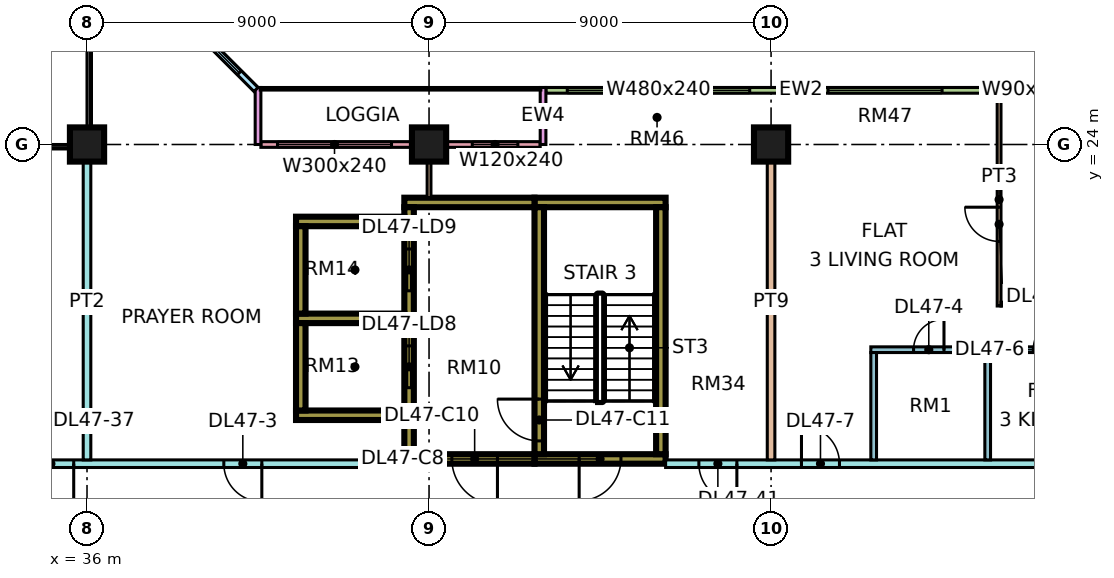
"""IFC4 building model, lengths in metres.
Left out: names, types, materials, properties, quantities, classifications, styles, units other than length and angle.
Written with IfcOpenShell. Run it as: python <this file> out.ifc"""

import sys

from ifc_helpers import new_model, si_unit, direction, frame, frame_2d, origin, origin_2d, place, context, subcontext, project, spatial, rectangle, extrude, element, fill, save


model = new_model("IFC4")
c1 = context("Model", 3, precision=1e-05, world=origin(), true_north=direction((0.0, 1.0)))
c2 = subcontext(c1, "Body", "Model", "MODEL_VIEW")
j1 = project(units=[si_unit("LENGTHUNIT", "METRE"), si_unit("PLANEANGLEUNIT", "RADIAN")], contexts=[c1])
p1 = place(None, origin())
s1 = spatial("IfcSite", under=j1, at=p1, CompositionType="ELEMENT")
p2 = place(p1, origin())
s2 = spatial("IfcBuilding", under=s1, at=p2, CompositionType="ELEMENT")
p3 = place(p2, frame((0.0, 0.0, 202.4)))
s3 = spatial("IfcBuildingStorey", under=s2, at=p3, CompositionType="ELEMENT", Elevation=202.4)
for number, where, z_axis, x_axis in (
    (1, (36.0, 24.0, 0.0), (0.0, 0.0, 1.0), (1.0, 0.0, 0.0)),
    (2, (45.0, 24.0, 0.0), (0.0, 0.0, 1.0), (1.0, 0.0, 0.0)),
    (3, (54.0, 24.0, 0.0), (0.0, 0.0, 1.0), (1.0, 0.0, 0.0)),
):
    element("IfcColumn", number, at=place(p3, frame(where, z_axis=z_axis, x_axis=x_axis)), inside=s3, PredefinedType="COLUMN", context=c2, shape_type="SweptSolid", body=[
        extrude(rectangle(XDim=0.9, YDim=0.9, at=origin_2d()), origin(), (0.0, 0.0, 1.0), 3.75),
    ])
p4 = place(p3, frame((47.775, 15.725, 0.0), z_axis=(0.0, 0.0, 1.0), x_axis=(1.0, 0.0, 0.0)))
e4 = element("IfcWall", 4, at=p4, inside=s3, PredefinedType="SHEAR", context=c2, shape_type="SweptSolid", body=[
    extrude(rectangle(XDim=3.45, YDim=0.25, at=frame_2d((1.725, 0.0))), origin(), (0.0, 0.0, 1.0), 3.75),
])
p5 = place(p4, frame((1.175, 0.0, 0.0)))
e5 = element("IfcOpeningElement", 5, at=p5, cuts=e4, PredefinedType="OPENING", context=c2, shape_type="SweptSolid", body=[
    extrude(rectangle(XDim=1.1, YDim=2.2, at=frame_2d((0.55, 1.1))), frame((0.0, 0.135, 0.0), z_axis=(0.0, -1.0, 0.0), x_axis=(1.0, 0.0, 0.0)), (0.0, 0.0, 1.0), 0.27),
])
p6 = place(p3, frame((47.775, 22.475, 0.0), z_axis=(0.0, 0.0, 1.0), x_axis=(1.0, 0.0, 0.0)))
e6 = element("IfcWall", 6, at=p6, inside=s3, PredefinedType="SHEAR", context=c2, shape_type="SweptSolid", body=[
    extrude(rectangle(XDim=3.45, YDim=0.25, at=frame_2d((1.725, 0.0))), origin(), (0.0, 0.0, 1.0), 3.75),
])
p7 = place(p3, frame((47.9, 15.85, 0.0), z_axis=(0.0, 0.0, 1.0), x_axis=(0.0, 1.0, 0.0)))
e7 = element("IfcWall", 7, at=p7, inside=s3, PredefinedType="SHEAR", context=c2, shape_type="SweptSolid", body=[
    extrude(rectangle(XDim=6.5, YDim=0.25, at=frame_2d((3.25, 0.0))), origin(), (0.0, 0.0, 1.0), 3.75),
])
p8 = place(p7, frame((0.35, 0.0, 0.0)))
e8 = element("IfcOpeningElement", 8, at=p8, cuts=e7, PredefinedType="OPENING", context=c2, shape_type="SweptSolid", body=[
    extrude(rectangle(XDim=1.1, YDim=2.2, at=frame_2d((0.55, 1.1))), frame((0.0, 0.135, 0.0), z_axis=(0.0, -1.0, 0.0), x_axis=(1.0, 0.0, 0.0)), (0.0, 0.0, 1.0), 0.27),
])
p9 = place(p3, frame((51.1, 15.85, 0.0), z_axis=(0.0, 0.0, 1.0), x_axis=(0.0, 1.0, 0.0)))
e9 = element("IfcWall", 9, at=p9, inside=s3, PredefinedType="SHEAR", context=c2, shape_type="SweptSolid", body=[
    extrude(rectangle(XDim=6.5, YDim=0.25, at=frame_2d((3.25, 0.0))), origin(), (0.0, 0.0, 1.0), 3.75),
])
p10 = place(p3, frame((44.35, 15.725, 0.0), z_axis=(0.0, 0.0, 1.0), x_axis=(1.0, 0.0, 0.0)))
e10 = element("IfcWall", 10, at=p10, inside=s3, PredefinedType="SHEAR", context=c2, shape_type="SweptSolid", body=[
    extrude(rectangle(XDim=3.425, YDim=0.25, at=frame_2d((1.712, 0.0))), origin(), (0.0, 0.0, 1.0), 3.75),
])
p11 = place(p10, frame((1.25, 0.0, 0.0)))
e11 = element("IfcOpeningElement", 11, at=p11, cuts=e10, PredefinedType="OPENING", context=c2, shape_type="SweptSolid", body=[
    extrude(rectangle(XDim=1.2, YDim=2.2, at=frame_2d((0.6, 1.1))), frame((0.0, 0.135, 0.0), z_axis=(0.0, -1.0, 0.0), x_axis=(1.0, 0.0, 0.0)), (0.0, 0.0, 1.0), 0.27),
])
p12 = place(p3, frame((44.35, 22.475, 0.0), z_axis=(0.0, 0.0, 1.0), x_axis=(1.0, 0.0, 0.0)))
e12 = element("IfcWall", 12, at=p12, inside=s3, PredefinedType="SHEAR", context=c2, shape_type="SweptSolid", body=[
    extrude(rectangle(XDim=3.425, YDim=0.25, at=frame_2d((1.712, 0.0))), origin(), (0.0, 0.0, 1.0), 3.75),
])
p13 = place(p3, frame((44.475, 15.85, 0.0), z_axis=(0.0, 0.0, 1.0), x_axis=(0.0, 1.0, 0.0)))
e13 = element("IfcWall", 13, at=p13, inside=s3, PredefinedType="SHEAR", context=c2, shape_type="SweptSolid", body=[
    extrude(rectangle(XDim=6.5, YDim=0.25, at=frame_2d((3.25, 0.0))), origin(), (0.0, 0.0, 1.0), 3.75),
])
p14 = place(p13, frame((1.75, 0.0, 0.0)))
e14 = element("IfcOpeningElement", 14, at=p14, cuts=e13, PredefinedType="OPENING", context=c2, shape_type="SweptSolid", body=[
    extrude(rectangle(XDim=1.1, YDim=2.2, at=frame_2d((0.55, 1.1))), frame((0.0, 0.135, 0.0), z_axis=(0.0, -1.0, 0.0), x_axis=(1.0, 0.0, 0.0)), (0.0, 0.0, 1.0), 0.27),
])
p15 = place(p13, frame((4.3, 0.0, 0.0)))
e15 = element("IfcOpeningElement", 15, at=p15, cuts=e13, PredefinedType="OPENING", context=c2, shape_type="SweptSolid", body=[
    extrude(rectangle(XDim=1.1, YDim=2.2, at=frame_2d((0.55, 1.1))), frame((0.0, 0.135, 0.0), z_axis=(0.0, -1.0, 0.0), x_axis=(1.0, 0.0, 0.0)), (0.0, 0.0, 1.0), 0.27),
])
for number, where, z_axis, x_axis in (
    (16, (41.5, 16.875, 0.0), (0.0, 0.0, 1.0), (1.0, 0.0, 0.0)),
    (17, (41.5, 19.425, 0.0), (0.0, 0.0, 1.0), (1.0, 0.0, 0.0)),
    (18, (41.5, 21.975, 0.0), (0.0, 0.0, 1.0), (1.0, 0.0, 0.0)),
):
    element("IfcWall", number, at=place(p3, frame(where, z_axis=z_axis, x_axis=x_axis)), inside=s3, PredefinedType="SHEAR", context=c2, shape_type="SweptSolid", body=[
        extrude(rectangle(XDim=2.85, YDim=0.25, at=frame_2d((1.425, 0.0))), origin(), (0.0, 0.0, 1.0), 3.75),
    ])
for number, where, z_axis, x_axis in (
    (19, (41.625, 17.0, 0.0), (0.0, 0.0, 1.0), (0.0, 1.0, 0.0)),
    (20, (41.625, 19.55, 0.0), (0.0, 0.0, 1.0), (0.0, 1.0, 0.0)),
):
    element("IfcWall", number, at=place(p3, frame(where, z_axis=z_axis, x_axis=x_axis)), inside=s3, PredefinedType="SHEAR", context=c2, shape_type="SweptSolid", body=[
        extrude(rectangle(XDim=2.3, YDim=0.25, at=frame_2d((1.15, 0.0))), origin(), (0.0, 0.0, 1.0), 3.75),
    ])
p16 = place(p3, frame((61.5, 25.425, 0.0), z_axis=(0.0, 0.0, 1.0), x_axis=(-1.0, 0.0, 0.0)))
e21 = element("IfcWall", 21, at=p16, inside=s3, PredefinedType="SOLIDWALL", context=c2, shape_type="SweptSolid", body=[
    extrude(rectangle(XDim=13.425, YDim=0.15, at=frame_2d((6.712, 0.0))), origin(), (0.0, 0.0, 1.0), 3.3),
])
p17 = place(p16, frame((0.3, 0.0, 0.45)))
e22 = element("IfcOpeningElement", 22, at=p17, cuts=e21, PredefinedType="OPENING", context=c2, shape_type="SweptSolid", body=[
    extrude(rectangle(XDim=0.9, YDim=2.4, at=frame_2d((0.45, 1.2))), frame((0.0, 0.085, 0.0), z_axis=(0.0, -1.0, 0.0), x_axis=(1.0, 0.0, 0.0)), (0.0, 0.0, 1.0), 0.17),
])
p18 = place(p16, frame((3.0, 0.0, 0.45)))
e23 = element("IfcOpeningElement", 23, at=p18, cuts=e21, PredefinedType="OPENING", context=c2, shape_type="SweptSolid", body=[
    extrude(rectangle(XDim=3.0, YDim=2.4, at=frame_2d((1.5, 1.2))), frame((0.0, 0.085, 0.0), z_axis=(0.0, -1.0, 0.0), x_axis=(1.0, 0.0, 0.0)), (0.0, 0.0, 1.0), 0.17),
])
p19 = place(p16, frame((8.062, 0.0, 0.45)))
e24 = element("IfcOpeningElement", 24, at=p19, cuts=e21, PredefinedType="OPENING", context=c2, shape_type="SweptSolid", body=[
    extrude(rectangle(XDim=4.8, YDim=2.4, at=frame_2d((2.4, 1.2))), frame((0.0, 0.085, 0.0), z_axis=(0.0, -1.0, 0.0), x_axis=(1.0, 0.0, 0.0)), (0.0, 0.0, 1.0), 0.17),
])
p20 = place(p3, frame((47.925, 24.0, 0.0), z_axis=(0.0, 0.0, 1.0), x_axis=(-1.0, 0.0, 0.0)))
e25 = element("IfcWall", 25, at=p20, inside=s3, PredefinedType="SOLIDWALL", context=c2, shape_type="SweptSolid", body=[
    extrude(rectangle(XDim=7.35, YDim=0.15, at=frame_2d((3.675, 0.0))), origin(), (0.0, 0.0, 1.0), 3.3),
])
p21 = place(p20, frame((0.587, 0.0, 0.45)))
e26 = element("IfcOpeningElement", 26, at=p21, cuts=e25, PredefinedType="OPENING", context=c2, shape_type="SweptSolid", body=[
    extrude(rectangle(XDim=1.2, YDim=2.4, at=frame_2d((0.6, 1.2))), frame((0.0, 0.085, 0.0), z_axis=(0.0, -1.0, 0.0), x_axis=(1.0, 0.0, 0.0)), (0.0, 0.0, 1.0), 0.17),
])
p22 = place(p20, frame((3.913, 0.0, 0.45)))
e27 = element("IfcOpeningElement", 27, at=p22, cuts=e25, PredefinedType="OPENING", context=c2, shape_type="SweptSolid", body=[
    extrude(rectangle(XDim=3.0, YDim=2.4, at=frame_2d((1.5, 1.2))), frame((0.0, 0.085, 0.0), z_axis=(0.0, -1.0, 0.0), x_axis=(1.0, 0.0, 0.0)), (0.0, 0.0, 1.0), 0.17),
])
for number, where, z_axis, x_axis in (
    (28, (48.0, 25.5, 0.0), (0.0, 0.0, 1.0), (0.0, -1.0, 0.0)),
    (29, (40.5, 25.5, 0.0), (0.0, 0.0, 1.0), (0.0, -1.0, 0.0)),
):
    element("IfcWall", number, at=place(p3, frame(where, z_axis=z_axis, x_axis=x_axis)), inside=s3, PredefinedType="SOLIDWALL", context=c2, shape_type="SweptSolid", body=[
        extrude(rectangle(XDim=1.5, YDim=0.15, at=frame_2d((0.75, 0.0))), origin(), (0.0, 0.0, 1.0), 3.3),
    ])
p23 = place(p3, frame((40.447, 25.447, 0.0), z_axis=(0.0, 0.0, 1.0), x_axis=(-0.707106781187, 0.707106781187, 0.0)))
e30 = element("IfcWall", 30, at=p23, inside=s3, PredefinedType="SOLIDWALL", context=c2, shape_type="SweptSolid", body=[
    extrude(rectangle(XDim=4.243, YDim=0.15, at=frame_2d((2.121, 0.0))), origin(), (0.0, 0.0, 1.0), 3.3),
])
p24 = place(p23, frame((0.621, 0.0, 0.45)))
e31 = element("IfcOpeningElement", 31, at=p24, cuts=e30, PredefinedType="OPENING", context=c2, shape_type="SweptSolid", body=[
    extrude(rectangle(XDim=3.0, YDim=2.4, at=frame_2d((1.5, 1.2))), frame((0.0, 0.085, 0.0), z_axis=(0.0, -1.0, 0.0), x_axis=(1.0, 0.0, 0.0)), (0.0, 0.0, 1.0), 0.17),
])
p25 = place(p3, frame((34.0, 15.6, 0.0), z_axis=(0.0, 0.0, 1.0), x_axis=(1.0, 0.0, 0.0)))
e32 = element("IfcWall", 32, at=p25, inside=s3, PredefinedType="PARTITIONING", context=c2, shape_type="SweptSolid", body=[
    extrude(rectangle(XDim=10.35, YDim=0.2, at=frame_2d((5.175, 0.0))), origin(), (0.0, 0.0, 1.0), 3.3),
])
p26 = place(p25, frame((5.6, 0.0, 0.0)))
e33 = element("IfcOpeningElement", 33, at=p26, cuts=e32, PredefinedType="OPENING", context=c2, shape_type="SweptSolid", body=[
    extrude(rectangle(XDim=1.0, YDim=2.1, at=frame_2d((0.5, 1.05))), frame((0.0, 0.11, 0.0), z_axis=(0.0, -1.0, 0.0), x_axis=(1.0, 0.0, 0.0)), (0.0, 0.0, 1.0), 0.22),
])
p27 = place(p25, frame((0.45, 0.0, 0.0)))
e34 = element("IfcOpeningElement", 34, at=p27, cuts=e32, PredefinedType="OPENING", context=c2, shape_type="SweptSolid", body=[
    extrude(rectangle(XDim=1.2, YDim=2.1, at=frame_2d((0.6, 1.05))), frame((0.0, 0.11, 0.0), z_axis=(0.0, -1.0, 0.0), x_axis=(1.0, 0.0, 0.0)), (0.0, 0.0, 1.0), 0.22),
])
p28 = place(p3, frame((36.0, 15.7, 0.0), z_axis=(0.0, 0.0, 1.0), x_axis=(0.0, 1.0, 0.0)))
e35 = element("IfcWall", 35, at=p28, inside=s3, PredefinedType="PARTITIONING", context=c2, shape_type="SweptSolid", body=[
    extrude(rectangle(XDim=8.3, YDim=0.2, at=frame_2d((4.15, 0.0))), origin(), (0.0, 0.0, 1.0), 3.3),
])
p29 = place(p3, frame((45.0, 22.6, 0.0), z_axis=(0.0, 0.0, 1.0), x_axis=(0.0, 1.0, 0.0)))
e36 = element("IfcWall", 36, at=p29, inside=s3, PredefinedType="PARTITIONING", context=c2, shape_type="SweptSolid", body=[
    extrude(rectangle(XDim=1.326, YDim=0.1, at=frame_2d((0.663, 0.0))), origin(), (0.0, 0.0, 1.0), 3.3),
])
p30 = place(p3, frame((51.225, 15.6, 0.0), z_axis=(0.0, 0.0, 1.0), x_axis=(1.0, 0.0, 0.0)))
e37 = element("IfcWall", 37, at=p30, inside=s3, PredefinedType="PARTITIONING", context=c2, shape_type="SweptSolid", body=[
    extrude(rectangle(XDim=11.701, YDim=0.2, at=frame_2d((5.851, 0.0))), origin(), (0.0, 0.0, 1.0), 3.3),
])
p31 = place(p30, frame((3.575, 0.0, 0.0)))
e38 = element("IfcOpeningElement", 38, at=p31, cuts=e37, PredefinedType="OPENING", context=c2, shape_type="SweptSolid", body=[
    extrude(rectangle(XDim=1.0, YDim=2.1, at=frame_2d((0.5, 1.05))), frame((0.0, 0.11, 0.0), z_axis=(0.0, -1.0, 0.0), x_axis=(1.0, 0.0, 0.0)), (0.0, 0.0, 1.0), 0.22),
])
p32 = place(p30, frame((0.875, 0.0, 0.0)))
e39 = element("IfcOpeningElement", 39, at=p32, cuts=e37, PredefinedType="OPENING", context=c2, shape_type="SweptSolid", body=[
    extrude(rectangle(XDim=1.0, YDim=2.1, at=frame_2d((0.5, 1.05))), frame((0.0, 0.11, 0.0), z_axis=(0.0, -1.0, 0.0), x_axis=(1.0, 0.0, 0.0)), (0.0, 0.0, 1.0), 0.22),
])
p33 = place(p3, frame((54.0, 15.7, 0.0), z_axis=(0.0, 0.0, 1.0), x_axis=(0.0, 1.0, 0.0)))
e40 = element("IfcWall", 40, at=p33, inside=s3, PredefinedType="PARTITIONING", context=c2, shape_type="SweptSolid", body=[
    extrude(rectangle(XDim=8.3, YDim=0.2, at=frame_2d((4.15, 0.0))), origin(), (0.0, 0.0, 1.0), 3.3),
])
p34 = place(p3, frame((56.625, 18.6, 0.0), z_axis=(0.0, 0.0, 1.0), x_axis=(1.0, 0.0, 0.0)))
e41 = element("IfcWall", 41, at=p34, inside=s3, PredefinedType="PARTITIONING", context=c2, shape_type="SweptSolid", body=[
    extrude(rectangle(XDim=6.301, YDim=0.15, at=frame_2d((3.15, 0.0))), origin(), (0.0, 0.0, 1.0), 3.3),
])
p35 = place(p34, frame((1.125, 0.0, 0.0)))
e42 = element("IfcOpeningElement", 42, at=p35, cuts=e41, PredefinedType="OPENING", context=c2, shape_type="SweptSolid", body=[
    extrude(rectangle(XDim=0.8, YDim=2.1, at=frame_2d((0.4, 1.05))), frame((0.0, 0.085, 0.0), z_axis=(0.0, -1.0, 0.0), x_axis=(1.0, 0.0, 0.0)), (0.0, 0.0, 1.0), 0.17),
])
p36 = place(p34, frame((4.275, 0.0, 0.0)))
e43 = element("IfcOpeningElement", 43, at=p36, cuts=e41, PredefinedType="OPENING", context=c2, shape_type="SweptSolid", body=[
    extrude(rectangle(XDim=0.9, YDim=2.1, at=frame_2d((0.45, 1.05))), frame((0.0, 0.085, 0.0), z_axis=(0.0, -1.0, 0.0), x_axis=(1.0, 0.0, 0.0)), (0.0, 0.0, 1.0), 0.17),
])
for number, where, z_axis, x_axis in (
    (44, (56.7, 15.7, 0.0), (0.0, 0.0, 1.0), (0.0, 1.0, 0.0)),
    (45, (59.7, 15.7, 0.0), (0.0, 0.0, 1.0), (0.0, 1.0, 0.0)),
):
    element("IfcWall", number, at=place(p3, frame(where, z_axis=z_axis, x_axis=x_axis)), inside=s3, PredefinedType="PARTITIONING", context=c2, shape_type="SweptSolid", body=[
        extrude(rectangle(XDim=2.825, YDim=0.15, at=frame_2d((1.413, 0.0))), origin(), (0.0, 0.0, 1.0), 3.3),
    ])
p37 = place(p3, frame((60.0, 19.75, 0.0), z_axis=(0.0, 0.0, 1.0), x_axis=(0.0, 1.0, 0.0)))
e46 = element("IfcWall", 46, at=p37, inside=s3, PredefinedType="PARTITIONING", context=c2, shape_type="SweptSolid", body=[
    extrude(rectangle(XDim=5.6, YDim=0.1, at=frame_2d((2.8, 0.0))), origin(), (0.0, 0.0, 1.0), 3.3),
])
p38 = place(p37, frame((1.7, 0.0, 0.0)))
e47 = element("IfcOpeningElement", 47, at=p38, cuts=e46, PredefinedType="OPENING", context=c2, shape_type="SweptSolid", body=[
    extrude(rectangle(XDim=0.9, YDim=2.1, at=frame_2d((0.45, 1.05))), frame((0.0, 0.06, 0.0), z_axis=(0.0, -1.0, 0.0), x_axis=(1.0, 0.0, 0.0)), (0.0, 0.0, 1.0), 0.12),
])
p39 = place(p3, frame((60.05, 19.8, 0.0), z_axis=(0.0, 0.0, 1.0), x_axis=(1.0, 0.0, 0.0)))
e48 = element("IfcWall", 48, at=p39, inside=s3, PredefinedType="PARTITIONING", context=c2, shape_type="SweptSolid", body=[
    extrude(rectangle(XDim=2.876, YDim=0.1, at=frame_2d((1.438, 0.0))), origin(), (0.0, 0.0, 1.0), 3.3),
])
p40 = place(p17, origin())
e49 = element("IfcWindow", 49, at=p40, inside=s3, PartitioningType="SINGLE_PANEL", PredefinedType="WINDOW", context=c2, shape_type="SweptSolid", body=[
    extrude(rectangle(XDim=0.9, YDim=2.4, at=frame_2d((0.45, 1.2))), frame((0.0, 0.03, 0.0), z_axis=(0.0, -1.0, 0.0), x_axis=(1.0, 0.0, 0.0)), (0.0, 0.0, 1.0), 0.06),
])
fill(e22, e49)
p41 = place(p18, origin())
e50 = element("IfcWindow", 50, at=p41, inside=s3, PartitioningType="SINGLE_PANEL", PredefinedType="WINDOW", context=c2, shape_type="SweptSolid", body=[
    extrude(rectangle(XDim=3.0, YDim=2.4, at=frame_2d((1.5, 1.2))), frame((0.0, 0.03, 0.0), z_axis=(0.0, -1.0, 0.0), x_axis=(1.0, 0.0, 0.0)), (0.0, 0.0, 1.0), 0.06),
])
fill(e23, e50)
p42 = place(p19, origin())
e51 = element("IfcWindow", 51, at=p42, inside=s3, PartitioningType="SINGLE_PANEL", PredefinedType="WINDOW", context=c2, shape_type="SweptSolid", body=[
    extrude(rectangle(XDim=4.8, YDim=2.4, at=frame_2d((2.4, 1.2))), frame((0.0, 0.03, 0.0), z_axis=(0.0, -1.0, 0.0), x_axis=(1.0, 0.0, 0.0)), (0.0, 0.0, 1.0), 0.06),
])
fill(e24, e51)
p43 = place(p21, origin())
e52 = element("IfcWindow", 52, at=p43, inside=s3, PartitioningType="SINGLE_PANEL", PredefinedType="WINDOW", context=c2, shape_type="SweptSolid", body=[
    extrude(rectangle(XDim=1.2, YDim=2.4, at=frame_2d((0.6, 1.2))), frame((0.0, 0.03, 0.0), z_axis=(0.0, -1.0, 0.0), x_axis=(1.0, 0.0, 0.0)), (0.0, 0.0, 1.0), 0.06),
])
fill(e26, e52)
p44 = place(p22, origin())
e53 = element("IfcWindow", 53, at=p44, inside=s3, PartitioningType="SINGLE_PANEL", PredefinedType="WINDOW", context=c2, shape_type="SweptSolid", body=[
    extrude(rectangle(XDim=3.0, YDim=2.4, at=frame_2d((1.5, 1.2))), frame((0.0, 0.03, 0.0), z_axis=(0.0, -1.0, 0.0), x_axis=(1.0, 0.0, 0.0)), (0.0, 0.0, 1.0), 0.06),
])
fill(e27, e53)
p45 = place(p24, origin())
e54 = element("IfcWindow", 54, at=p45, inside=s3, PartitioningType="SINGLE_PANEL", PredefinedType="WINDOW", context=c2, shape_type="SweptSolid", body=[
    extrude(rectangle(XDim=3.0, YDim=2.4, at=frame_2d((1.5, 1.2))), frame((0.0, 0.03, 0.0), z_axis=(0.0, -1.0, 0.0), x_axis=(1.0, 0.0, 0.0)), (0.0, 0.0, 1.0), 0.06),
])
fill(e31, e54)
p46 = place(p5, frame((1.1, 0.0, 0.0), z_axis=(0.0, 0.0, 1.0), x_axis=(-1.0, 0.0, 0.0)))
e55 = element("IfcDoor", 55, at=p46, inside=s3, OperationType="SINGLE_SWING_LEFT", PredefinedType="DOOR", context=c2, shape_type="SweptSolid", body=[
    extrude(rectangle(XDim=1.1, YDim=2.2, at=frame_2d((0.55, 1.1))), frame((0.0, 0.025, 0.0), z_axis=(0.0, -1.0, 0.0), x_axis=(1.0, 0.0, 0.0)), (0.0, 0.0, 1.0), 0.05),
])
fill(e5, e55)
p47 = place(p11, origin())
e56 = element("IfcDoor", 56, at=p47, inside=s3, OperationType="SINGLE_SWING_RIGHT", PredefinedType="DOOR", context=c2, shape_type="SweptSolid", body=[
    extrude(rectangle(XDim=1.2, YDim=2.2, at=frame_2d((0.6, 1.1))), frame((0.0, 0.025, 0.0), z_axis=(0.0, -1.0, 0.0), x_axis=(1.0, 0.0, 0.0)), (0.0, 0.0, 1.0), 0.05),
])
fill(e11, e56)
p48 = place(p8, frame((1.1, 0.0, 0.0), z_axis=(0.0, 0.0, 1.0), x_axis=(-1.0, 0.0, 0.0)))
e57 = element("IfcDoor", 57, at=p48, inside=s3, OperationType="SINGLE_SWING_RIGHT", PredefinedType="DOOR", context=c2, shape_type="SweptSolid", body=[
    extrude(rectangle(XDim=1.1, YDim=2.2, at=frame_2d((0.55, 1.1))), frame((0.0, 0.025, 0.0), z_axis=(0.0, -1.0, 0.0), x_axis=(1.0, 0.0, 0.0)), (0.0, 0.0, 1.0), 0.05),
])
fill(e8, e57)
p49 = place(p14, origin())
e58 = element("IfcDoor", 58, at=p49, inside=s3, OperationType="DOUBLE_DOOR_SLIDING", PredefinedType="DOOR", context=c2, shape_type="SweptSolid", body=[
    extrude(rectangle(XDim=1.1, YDim=2.2, at=frame_2d((0.55, 1.1))), frame((0.0, 0.025, 0.0), z_axis=(0.0, -1.0, 0.0), x_axis=(1.0, 0.0, 0.0)), (0.0, 0.0, 1.0), 0.05),
])
fill(e14, e58)
p50 = place(p15, origin())
e59 = element("IfcDoor", 59, at=p50, inside=s3, OperationType="DOUBLE_DOOR_SLIDING", PredefinedType="DOOR", context=c2, shape_type="SweptSolid", body=[
    extrude(rectangle(XDim=1.1, YDim=2.2, at=frame_2d((0.55, 1.1))), frame((0.0, 0.025, 0.0), z_axis=(0.0, -1.0, 0.0), x_axis=(1.0, 0.0, 0.0)), (0.0, 0.0, 1.0), 0.05),
])
fill(e15, e59)
p51 = place(p26, origin())
e60 = element("IfcDoor", 60, at=p51, inside=s3, OperationType="SINGLE_SWING_RIGHT", PredefinedType="DOOR", context=c2, shape_type="SweptSolid", body=[
    extrude(rectangle(XDim=1.0, YDim=2.1, at=frame_2d((0.5, 1.05))), frame((0.0, 0.025, 0.0), z_axis=(0.0, -1.0, 0.0), x_axis=(1.0, 0.0, 0.0)), (0.0, 0.0, 1.0), 0.05),
])
fill(e33, e60)
p52 = place(p35, frame((0.8, 0.0, 0.0), z_axis=(0.0, 0.0, 1.0), x_axis=(-1.0, 0.0, 0.0)))
e61 = element("IfcDoor", 61, at=p52, inside=s3, OperationType="SINGLE_SWING_RIGHT", PredefinedType="DOOR", context=c2, shape_type="SweptSolid", body=[
    extrude(rectangle(XDim=0.8, YDim=2.1, at=frame_2d((0.4, 1.05))), frame((0.0, 0.025, 0.0), z_axis=(0.0, -1.0, 0.0), x_axis=(1.0, 0.0, 0.0)), (0.0, 0.0, 1.0), 0.05),
])
fill(e42, e61)
p53 = place(p38, frame((0.9, 0.0, 0.0), z_axis=(0.0, 0.0, 1.0), x_axis=(-1.0, 0.0, 0.0)))
e62 = element("IfcDoor", 62, at=p53, inside=s3, OperationType="SINGLE_SWING_RIGHT", PredefinedType="DOOR", context=c2, shape_type="SweptSolid", body=[
    extrude(rectangle(XDim=0.9, YDim=2.1, at=frame_2d((0.45, 1.05))), frame((0.0, 0.025, 0.0), z_axis=(0.0, -1.0, 0.0), x_axis=(1.0, 0.0, 0.0)), (0.0, 0.0, 1.0), 0.05),
])
fill(e47, e62)
p54 = place(p36, frame((0.9, 0.0, 0.0), z_axis=(0.0, 0.0, 1.0), x_axis=(-1.0, 0.0, 0.0)))
e63 = element("IfcDoor", 63, at=p54, inside=s3, OperationType="SINGLE_SWING_RIGHT", PredefinedType="DOOR", context=c2, shape_type="SweptSolid", body=[
    extrude(rectangle(XDim=0.9, YDim=2.1, at=frame_2d((0.45, 1.05))), frame((0.0, 0.025, 0.0), z_axis=(0.0, -1.0, 0.0), x_axis=(1.0, 0.0, 0.0)), (0.0, 0.0, 1.0), 0.05),
])
fill(e43, e63)
p55 = place(p31, origin())
e64 = element("IfcDoor", 64, at=p55, inside=s3, OperationType="SINGLE_SWING_LEFT", PredefinedType="DOOR", context=c2, shape_type="SweptSolid", body=[
    extrude(rectangle(XDim=1.0, YDim=2.1, at=frame_2d((0.5, 1.05))), frame((0.0, 0.025, 0.0), z_axis=(0.0, -1.0, 0.0), x_axis=(1.0, 0.0, 0.0)), (0.0, 0.0, 1.0), 0.05),
])
fill(e38, e64)
p56 = place(p27, origin())
e65 = element("IfcDoor", 65, at=p56, inside=s3, OperationType="SINGLE_SWING_RIGHT", PredefinedType="DOOR", context=c2, shape_type="SweptSolid", body=[
    extrude(rectangle(XDim=1.2, YDim=2.1, at=frame_2d((0.6, 1.05))), frame((0.0, 0.025, 0.0), z_axis=(0.0, -1.0, 0.0), x_axis=(1.0, 0.0, 0.0)), (0.0, 0.0, 1.0), 0.05),
])
fill(e34, e65)
p57 = place(p32, origin())
e66 = element("IfcDoor", 66, at=p57, inside=s3, OperationType="SINGLE_SWING_RIGHT", PredefinedType="DOOR", context=c2, shape_type="SweptSolid", body=[
    extrude(rectangle(XDim=1.0, YDim=2.1, at=frame_2d((0.5, 1.05))), frame((0.0, 0.025, 0.0), z_axis=(0.0, -1.0, 0.0), x_axis=(1.0, 0.0, 0.0)), (0.0, 0.0, 1.0), 0.05),
])
fill(e39, e66)
save(model, sys.argv[1])
